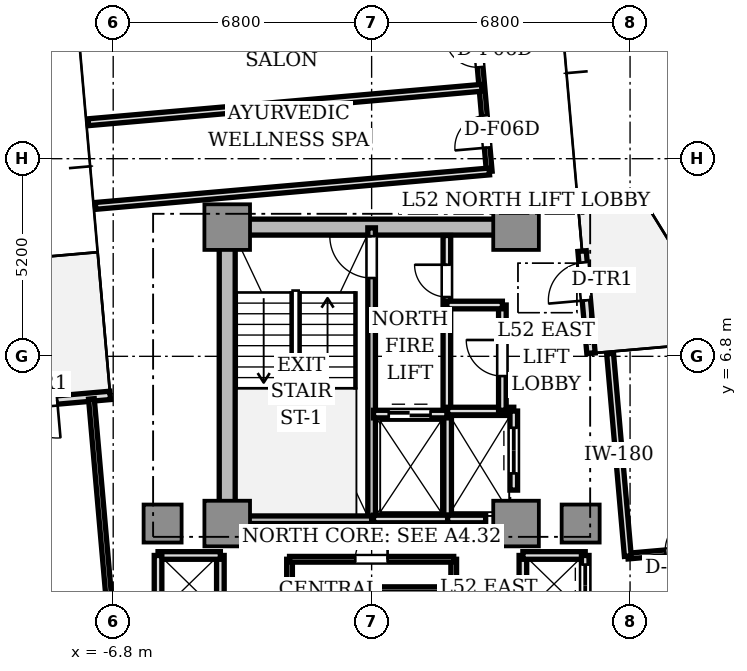
"""IFC4 building model, lengths in metres.
Left out: names, types, materials, properties, quantities, classifications, styles, units other than length and angle.
Written with IfcOpenShell. Run it as: python <this file> out.ifc"""

import sys

from ifc_helpers import new_model, si_unit, direction, frame, frame_2d, origin, origin_2d, place, context, subcontext, project, spatial, rectangle, extrude, source, transform, mapped, element, fill, save


model = new_model("IFC4")
c1 = context("Model", 3, precision=1e-05, world=origin(), true_north=direction((0.0, 1.0)))
c2 = subcontext(c1, "Body", "Model", "MODEL_VIEW")
j1 = project(units=[si_unit("LENGTHUNIT", "METRE"), si_unit("PLANEANGLEUNIT", "RADIAN")], contexts=[c1])
p1 = place(None, origin())
s1 = spatial("IfcSite", under=j1, at=p1, CompositionType="ELEMENT")
p2 = place(p1, origin())
s2 = spatial("IfcBuilding", under=s1, at=p2, CompositionType="ELEMENT")
p3 = place(p2, frame((0.0, 0.0, 188.6)))
s3 = spatial("IfcBuildingStorey", under=s2, at=p3, CompositionType="ELEMENT", Elevation=188.6)
p4 = place(p3, frame((-3.55, 10.2, 0.0), z_axis=(0.0, 0.0, 1.0), x_axis=(1.0, 0.0, 0.0)))
e1 = element("IfcWall", 1, at=p4, inside=s3, PredefinedType="SHEAR", context=c2, shape_type="SweptSolid", body=[
    extrude(rectangle(XDim=7.1, YDim=0.42, at=frame_2d((3.55, 0.0))), origin(), (0.0, 0.0, 1.0), 3.11),
])
p5 = place(p3, frame((-3.8, 2.85, 0.0), z_axis=(0.0, 0.0, 1.0), x_axis=(0.0, 1.0, 0.0)))
e2 = element("IfcWall", 2, at=p5, inside=s3, PredefinedType="SHEAR", context=c2, shape_type="SweptSolid", body=[
    extrude(rectangle(XDim=6.9, YDim=0.42, at=frame_2d((3.45, 0.0))), origin(), (0.0, 0.0, 1.0), 3.11),
])
m1 = source(origin(), c2, "Body", "SweptSolid", [
    extrude(rectangle(XDim=1.2, YDim=1.2, at=origin_2d()), origin(), (0.0, 0.0, 1.0), 3.11),
])
for number, where, z_axis, x_axis in (
    (3, (-3.8, 2.4, 0.0), (0.0, 0.0, 1.0), (1.0, 0.0, 0.0)),
    (4, (3.8, 2.4, 0.0), (0.0, 0.0, 1.0), (1.0, 0.0, 0.0)),
    (5, (-3.8, 10.2, 0.0), (0.0, 0.0, 1.0), (1.0, 0.0, 0.0)),
    (6, (3.8, 10.2, 0.0), (0.0, 0.0, 1.0), (1.0, 0.0, 0.0)),
):
    element("IfcColumn", number, at=place(p3, frame(where, z_axis=z_axis, x_axis=x_axis)), inside=s3, PredefinedType="COLUMN", context=c2, shape_type="MappedRepresentation", body=[
        mapped(m1, transform((0.0, 0.0, 0.0), scale=1.0)),
    ])
m2 = source(origin(), c2, "Body", "SweptSolid", [
    extrude(rectangle(XDim=1.0, YDim=1.0, at=origin_2d()), origin(), (0.0, 0.0, 1.0), 3.11),
])
for number, where, z_axis, x_axis in (
    (7, (5.5, 2.4, 0.0), (0.0, 0.0, 1.0), (1.0, 0.0, 0.0)),
    (8, (-5.5, 2.4, 0.0), (0.0, 0.0, 1.0), (1.0, 0.0, 0.0)),
):
    element("IfcColumn", number, at=place(p3, frame(where, z_axis=z_axis, x_axis=x_axis)), inside=s3, PredefinedType="COLUMN", context=c2, shape_type="MappedRepresentation", body=[
        mapped(m2, transform((0.0, 0.0, 0.0), scale=1.0)),
    ])
p6 = place(p3, frame((5.772, 6.879, 0.0), z_axis=(0.0, 0.0, 1.0), x_axis=(-0.087168071984, 0.996193619346, 0.0)))
e9 = element("IfcWall", 9, at=p6, inside=s3, PredefinedType="STANDARD", context=c2, shape_type="SweptSolid", body=[
    extrude(rectangle(XDim=2.7, YDim=0.22, at=frame_2d((1.35, 0.0))), origin(), (0.0, 0.0, 1.0), 3.11),
])
p7 = place(p6, frame((1.4, 0.0, 0.0)))
e10 = element("IfcOpeningElement", 10, at=p7, cuts=e9, PredefinedType="OPENING", context=c2, shape_type="SweptSolid", body=[
    extrude(rectangle(XDim=1.0, YDim=2.2, at=frame_2d((0.5, 1.1))), frame((0.0, 0.12, 0.0), z_axis=(0.0, -1.0, 0.0), x_axis=(1.0, 0.0, 0.0)), (0.0, 0.0, 1.0), 0.24),
])
p8 = place(p3, frame((-6.879, 5.772, 0.0), z_axis=(0.0, 0.0, 1.0), x_axis=(-0.996193619346, -0.087168071984, 0.0)))
e11 = element("IfcWall", 11, at=p8, inside=s3, PredefinedType="STANDARD", context=c2, shape_type="SweptSolid", body=[
    extrude(rectangle(XDim=2.7, YDim=0.22, at=frame_2d((1.35, 0.0))), origin(), (0.0, 0.0, 1.0), 3.11),
])
p9 = place(p8, frame((1.4, 0.0, 0.0)))
e12 = element("IfcOpeningElement", 12, at=p9, cuts=e11, PredefinedType="OPENING", context=c2, shape_type="SweptSolid", body=[
    extrude(rectangle(XDim=1.0, YDim=2.2, at=frame_2d((0.5, 1.1))), frame((0.0, 0.12, 0.0), z_axis=(0.0, -1.0, 0.0), x_axis=(1.0, 0.0, 0.0)), (0.0, 0.0, 1.0), 0.24),
])
p10 = place(p3, frame((0.0, 2.5, 0.0), z_axis=(0.0, 0.0, 1.0), x_axis=(0.0, 1.0, 0.0)))
e13 = element("IfcWall", 13, at=p10, inside=s3, PredefinedType="SOLIDWALL", context=c2, shape_type="SweptSolid", body=[
    extrude(rectangle(XDim=7.68, YDim=0.2, at=frame_2d((3.84, 0.0))), origin(), (0.0, 0.0, 1.0), 3.11),
])
p11 = place(p10, frame((6.36, 0.0, 0.0)))
e14 = element("IfcOpeningElement", 14, at=p11, cuts=e13, PredefinedType="OPENING", context=c2, shape_type="SweptSolid", body=[
    extrude(rectangle(XDim=1.1, YDim=2.15, at=frame_2d((0.55, 1.075))), frame((0.0, 0.11, 0.0), z_axis=(0.0, -1.0, 0.0), x_axis=(1.0, 0.0, 0.0)), (0.0, 0.0, 1.0), 0.22),
])
p12 = place(p3, frame((-3.72, 2.5, 0.0), z_axis=(0.0, 0.0, 1.0), x_axis=(1.0, 0.0, 0.0)))
e15 = element("IfcWall", 15, at=p12, inside=s3, PredefinedType="SOLIDWALL", context=c2, shape_type="SweptSolid", body=[
    extrude(rectangle(XDim=3.72, YDim=0.2, at=frame_2d((1.86, 0.0))), origin(), (0.0, 0.0, 1.0), 3.11),
])
p13 = place(p3, frame((1.98, 5.32, 0.0), z_axis=(0.0, 0.0, 1.0), x_axis=(0.0, 1.0, 0.0)))
e16 = element("IfcWall", 16, at=p13, inside=s3, PredefinedType="SOLIDWALL", context=c2, shape_type="SweptSolid", body=[
    extrude(rectangle(XDim=4.66, YDim=0.2, at=frame_2d((2.33, 0.0))), origin(), (0.0, 0.0, 1.0), 2.66),
])
p14 = place(p13, frame((3.04, 0.0, 0.0)))
e17 = element("IfcOpeningElement", 17, at=p14, cuts=e16, PredefinedType="OPENING", context=c2, shape_type="SweptSolid", body=[
    extrude(rectangle(XDim=0.85, YDim=2.1, at=frame_2d((0.425, 1.05))), frame((0.0, 0.11, 0.0), z_axis=(0.0, -1.0, 0.0), x_axis=(1.0, 0.0, 0.0)), (0.0, 0.0, 1.0), 0.22),
])
p15 = place(p3, frame((2.0, 2.5, 0.0), z_axis=(0.0, 0.0, 1.0), x_axis=(0.0, 1.0, 0.0)))
e18 = element("IfcWall", 18, at=p15, inside=s3, PredefinedType="SOLIDWALL", context=c2, shape_type="SweptSolid", body=[
    extrude(rectangle(XDim=2.78, YDim=0.2, at=frame_2d((1.39, 0.0))), origin(), (0.0, 0.0, 1.0), 2.66),
])
p16 = place(p3, frame((0.05, 2.52, 0.0), z_axis=(0.0, 0.0, 1.0), x_axis=(1.0, 0.0, 0.0)))
e19 = element("IfcWall", 19, at=p16, inside=s3, PredefinedType="SOLIDWALL", context=c2, shape_type="SweptSolid", body=[
    extrude(rectangle(XDim=1.95, YDim=0.2, at=frame_2d((0.975, 0.0))), origin(), (0.0, 0.0, 1.0), 2.66),
])
p17 = place(p3, frame((0.05, 5.28, 0.0), z_axis=(0.0, 0.0, 1.0), x_axis=(1.0, 0.0, 0.0)))
e20 = element("IfcWall", 20, at=p17, inside=s3, PredefinedType="SOLIDWALL", context=c2, shape_type="SweptSolid", body=[
    extrude(rectangle(XDim=1.93, YDim=0.2, at=frame_2d((0.965, 0.0))), origin(), (0.0, 0.0, 1.0), 2.66),
])
p18 = place(p17, frame((0.4, 0.0, 0.0)))
e21 = element("IfcOpeningElement", 21, at=p18, cuts=e20, PredefinedType="OPENING", context=c2, shape_type="SweptSolid", body=[
    extrude(rectangle(XDim=1.1, YDim=2.2, at=frame_2d((0.55, 1.1))), frame((0.0, 0.11, 0.0), z_axis=(0.0, -1.0, 0.0), x_axis=(1.0, 0.0, 0.0)), (0.0, 0.0, 1.0), 0.22),
])
p19 = place(p3, frame((2.0, 2.52, 0.0), z_axis=(0.0, 0.0, 1.0), x_axis=(1.0, 0.0, 0.0)))
e22 = element("IfcWall", 22, at=p19, inside=s3, PredefinedType="SOLIDWALL", context=c2, shape_type="SweptSolid", body=[
    extrude(rectangle(XDim=1.0, YDim=0.2, at=frame_2d((0.5, 0.0))), origin(), (0.0, 0.0, 1.0), 2.66),
])
p20 = place(p3, frame((2.0, 5.36, 0.0), z_axis=(0.0, 0.0, 1.0), x_axis=(1.0, 0.0, 0.0)))
e23 = element("IfcWall", 23, at=p20, inside=s3, PredefinedType="SOLIDWALL", context=c2, shape_type="SweptSolid", body=[
    extrude(rectangle(XDim=1.74, YDim=0.2, at=frame_2d((0.87, 0.0))), origin(), (0.0, 0.0, 1.0), 2.66),
])
p21 = place(p3, frame((3.74, 3.28, 0.0), z_axis=(0.0, 0.0, 1.0), x_axis=(0.0, 1.0, 0.0)))
e24 = element("IfcWall", 24, at=p21, inside=s3, PredefinedType="SOLIDWALL", context=c2, shape_type="SweptSolid", body=[
    extrude(rectangle(XDim=2.08, YDim=0.2, at=frame_2d((1.04, 0.0))), origin(), (0.0, 0.0, 1.0), 2.66),
])
p22 = place(p21, frame((0.44, 0.0, 0.0)))
e25 = element("IfcOpeningElement", 25, at=p22, cuts=e24, PredefinedType="OPENING", context=c2, shape_type="SweptSolid", body=[
    extrude(rectangle(XDim=1.2, YDim=2.2, at=frame_2d((0.6, 1.1))), frame((0.0, 0.11, 0.0), z_axis=(0.0, -1.0, 0.0), x_axis=(1.0, 0.0, 0.0)), (0.0, 0.0, 1.0), 0.22),
])
p23 = place(p3, frame((3.98, -1.56, 0.0), z_axis=(0.0, 0.0, 1.0), x_axis=(0.0, 1.0, 0.0)))
e26 = element("IfcWall", 26, at=p23, inside=s3, PredefinedType="SOLIDWALL", context=c2, shape_type="SweptSolid", body=[
    extrude(rectangle(XDim=3.12, YDim=0.2, at=frame_2d((1.56, 0.0))), origin(), (0.0, 0.0, 1.0), 2.28),
])
p24 = place(p3, frame((3.98, 1.56, 0.0), z_axis=(0.0, 0.0, 1.0), x_axis=(1.0, 0.0, 0.0)))
e27 = element("IfcWall", 27, at=p24, inside=s3, PredefinedType="SOLIDWALL", context=c2, shape_type="SweptSolid", body=[
    extrude(rectangle(XDim=1.64, YDim=0.2, at=frame_2d((0.82, 0.0))), origin(), (0.0, 0.0, 1.0), 2.66),
])
p25 = place(p3, frame((5.62, 0.0, 0.0), z_axis=(0.0, 0.0, 1.0), x_axis=(0.0, 1.0, 0.0)))
e28 = element("IfcWall", 28, at=p25, inside=s3, PredefinedType="SOLIDWALL", context=c2, shape_type="SweptSolid", body=[
    extrude(rectangle(XDim=1.56, YDim=0.2, at=frame_2d((0.78, 0.0))), origin(), (0.0, 0.0, 1.0), 2.66),
])
p26 = place(p25, frame((0.22, 0.0, 0.0)))
e29 = element("IfcOpeningElement", 29, at=p26, cuts=e28, PredefinedType="OPENING", context=c2, shape_type="SweptSolid", body=[
    extrude(rectangle(XDim=1.1, YDim=2.2, at=frame_2d((0.55, 1.1))), frame((0.0, 0.11, 0.0), z_axis=(0.0, -1.0, 0.0), x_axis=(1.0, 0.0, 0.0)), (0.0, 0.0, 1.0), 0.22),
])
p27 = place(p3, frame((-3.98, -1.56, 0.0), z_axis=(0.0, 0.0, 1.0), x_axis=(0.0, 1.0, 0.0)))
e30 = element("IfcWall", 30, at=p27, inside=s3, PredefinedType="SOLIDWALL", context=c2, shape_type="SweptSolid", body=[
    extrude(rectangle(XDim=3.12, YDim=0.2, at=frame_2d((1.56, 0.0))), origin(), (0.0, 0.0, 1.0), 2.28),
])
p28 = place(p3, frame((-5.62, 1.56, 0.0), z_axis=(0.0, 0.0, 1.0), x_axis=(1.0, 0.0, 0.0)))
e31 = element("IfcWall", 31, at=p28, inside=s3, PredefinedType="SOLIDWALL", context=c2, shape_type="SweptSolid", body=[
    extrude(rectangle(XDim=1.64, YDim=0.2, at=frame_2d((0.82, 0.0))), origin(), (0.0, 0.0, 1.0), 2.66),
])
p29 = place(p3, frame((-5.62, 0.0, 0.0), z_axis=(0.0, 0.0, 1.0), x_axis=(0.0, 1.0, 0.0)))
e32 = element("IfcWall", 32, at=p29, inside=s3, PredefinedType="SOLIDWALL", context=c2, shape_type="SweptSolid", body=[
    extrude(rectangle(XDim=1.56, YDim=0.2, at=frame_2d((0.78, 0.0))), origin(), (0.0, 0.0, 1.0), 2.66),
])
p30 = place(p3, frame((3.44, 5.38, 0.0), z_axis=(0.0, 0.0, 1.0), x_axis=(0.0, 1.0, 0.0)))
e33 = element("IfcWall", 33, at=p30, inside=s3, PredefinedType="SOLIDWALL", context=c2, shape_type="SweptSolid", body=[
    extrude(rectangle(XDim=2.77, YDim=0.2, at=frame_2d((1.385, 0.0))), origin(), (0.0, 0.0, 1.0), 2.66),
])
p31 = place(p30, frame((0.9, 0.0, 0.0)))
e34 = element("IfcOpeningElement", 34, at=p31, cuts=e33, PredefinedType="OPENING", context=c2, shape_type="SweptSolid", body=[
    extrude(rectangle(XDim=0.95, YDim=2.15, at=frame_2d((0.475, 1.075))), frame((0.0, 0.11, 0.0), z_axis=(0.0, -1.0, 0.0), x_axis=(1.0, 0.0, 0.0)), (0.0, 0.0, 1.0), 0.22),
])
p32 = place(p3, frame((1.98, 8.15, 0.0), z_axis=(0.0, 0.0, 1.0), x_axis=(1.0, 0.0, 0.0)))
e35 = element("IfcWall", 35, at=p32, inside=s3, PredefinedType="SOLIDWALL", context=c2, shape_type="SweptSolid", body=[
    extrude(rectangle(XDim=1.46, YDim=0.2, at=frame_2d((0.73, 0.0))), origin(), (0.0, 0.0, 1.0), 2.66),
])
p33 = place(p3, frame((2.16, -1.46, 0.0), z_axis=(0.0, 0.0, 1.0), x_axis=(0.0, 1.0, 0.0)))
e36 = element("IfcWall", 36, at=p33, inside=s3, PredefinedType="PARTITIONING", context=c2, shape_type="SweptSolid", body=[
    extrude(rectangle(XDim=2.92, YDim=0.15, at=frame_2d((1.46, 0.0))), origin(), (0.0, 0.0, 1.0), 2.66),
])
p34 = place(p33, frame((1.035, 0.0, 0.0)))
e37 = element("IfcOpeningElement", 37, at=p34, cuts=e36, PredefinedType="OPENING", context=c2, shape_type="SweptSolid", body=[
    extrude(rectangle(XDim=0.85, YDim=2.1, at=frame_2d((0.425, 1.05))), frame((0.0, 0.085, 0.0), z_axis=(0.0, -1.0, 0.0), x_axis=(1.0, 0.0, 0.0)), (0.0, 0.0, 1.0), 0.17),
])
p35 = place(p3, frame((-2.16, -1.46, 0.0), z_axis=(0.0, 0.0, 1.0), x_axis=(0.0, 1.0, 0.0)))
e38 = element("IfcWall", 38, at=p35, inside=s3, PredefinedType="PARTITIONING", context=c2, shape_type="SweptSolid", body=[
    extrude(rectangle(XDim=2.92, YDim=0.15, at=frame_2d((1.46, 0.0))), origin(), (0.0, 0.0, 1.0), 2.66),
])
p36 = place(p3, frame((-2.16, 1.46, 0.0), z_axis=(0.0, 0.0, 1.0), x_axis=(1.0, 0.0, 0.0)))
e39 = element("IfcWall", 39, at=p36, inside=s3, PredefinedType="PARTITIONING", context=c2, shape_type="SweptSolid", body=[
    extrude(rectangle(XDim=4.32, YDim=0.15, at=frame_2d((2.16, 0.0))), origin(), (0.0, 0.0, 1.0), 2.66),
])
p37 = place(p36, frame((1.73, 0.0, 0.0)))
e40 = element("IfcOpeningElement", 40, at=p37, cuts=e39, PredefinedType="OPENING", context=c2, shape_type="SweptSolid", body=[
    extrude(rectangle(XDim=0.85, YDim=2.1, at=frame_2d((0.425, 1.05))), frame((0.0, 0.085, 0.0), z_axis=(0.0, -1.0, 0.0), x_axis=(1.0, 0.0, 0.0)), (0.0, 0.0, 1.0), 0.17),
])
p38 = place(p3, frame((-2.16, 0.66, 0.0), z_axis=(0.0, 0.0, 1.0), x_axis=(1.0, 0.0, 0.0)))
e41 = element("IfcWall", 41, at=p38, inside=s3, PredefinedType="PARTITIONING", context=c2, shape_type="SweptSolid", body=[
    extrude(rectangle(XDim=4.32, YDim=0.15, at=frame_2d((2.16, 0.0))), origin(), (0.0, 0.0, 1.0), 2.66),
])
p39 = place(p3, frame((6.741, 1.543, 0.0), z_axis=(0.0, 0.0, 1.0), x_axis=(0.996195062465, 0.087151577845, 0.0)))
e42 = element("IfcWall", 42, at=p39, inside=s3, PredefinedType="PARTITIONING", context=c2, shape_type="SweptSolid", body=[
    extrude(rectangle(XDim=13.2, YDim=0.15, at=frame_2d((6.6, 0.0))), origin(), (0.0, 0.0, 1.0), 2.66),
])
p40 = place(p39, frame((0.992, 0.0, 0.0)))
e43 = element("IfcOpeningElement", 43, at=p40, cuts=e42, PredefinedType="OPENING", context=c2, shape_type="SweptSolid", body=[
    extrude(rectangle(XDim=0.85, YDim=2.1, at=frame_2d((0.425, 1.05))), frame((0.0, 0.085, 0.0), z_axis=(0.0, -1.0, 0.0), x_axis=(1.0, 0.0, 0.0)), (0.0, 0.0, 1.0), 0.17),
])
p41 = place(p39, frame((7.342, 0.0, 0.0)))
e44 = element("IfcOpeningElement", 44, at=p41, cuts=e42, PredefinedType="OPENING", context=c2, shape_type="SweptSolid", body=[
    extrude(rectangle(XDim=0.85, YDim=2.1, at=frame_2d((0.425, 1.05))), frame((0.0, 0.085, 0.0), z_axis=(0.0, -1.0, 0.0), x_axis=(1.0, 0.0, 0.0)), (0.0, 0.0, 1.0), 0.17),
])
p42 = place(p3, frame((6.907, -0.349, 0.0), z_axis=(0.0, 0.0, 1.0), x_axis=(0.996195062465, 0.087151577845, 0.0)))
e45 = element("IfcWall", 45, at=p42, inside=s3, PredefinedType="PARTITIONING", context=c2, shape_type="SweptSolid", body=[
    extrude(rectangle(XDim=13.2, YDim=0.15, at=frame_2d((6.6, 0.0))), origin(), (0.0, 0.0, 1.0), 2.66),
])
p43 = place(p42, frame((2.458, 0.0, 0.0)))
e46 = element("IfcOpeningElement", 46, at=p43, cuts=e45, PredefinedType="OPENING", context=c2, shape_type="SweptSolid", body=[
    extrude(rectangle(XDim=0.85, YDim=2.1, at=frame_2d((0.425, 1.05))), frame((0.0, 0.085, 0.0), z_axis=(0.0, -1.0, 0.0), x_axis=(1.0, 0.0, 0.0)), (0.0, 0.0, 1.0), 0.17),
])
p44 = place(p42, frame((9.308, 0.0, 0.0)))
e47 = element("IfcOpeningElement", 47, at=p44, cuts=e45, PredefinedType="OPENING", context=c2, shape_type="SweptSolid", body=[
    extrude(rectangle(XDim=0.85, YDim=2.1, at=frame_2d((0.425, 1.05))), frame((0.0, 0.085, 0.0), z_axis=(0.0, -1.0, 0.0), x_axis=(1.0, 0.0, 0.0)), (0.0, 0.0, 1.0), 0.17),
])
p45 = place(p3, frame((6.741, 1.543, 0.0), z_axis=(0.0, 0.0, 1.0), x_axis=(-0.087161289348, 0.996194212812, 0.0)))
e48 = element("IfcWall", 48, at=p45, inside=s3, PredefinedType="PARTITIONING", context=c2, shape_type="SweptSolid", body=[
    extrude(rectangle(XDim=5.35, YDim=0.18, at=frame_2d((2.675, 0.0))), origin(), (0.0, 0.0, 1.0), 2.66),
])
p46 = place(p3, frame((3.095, 11.664, 0.0), z_axis=(0.0, 0.0, 1.0), x_axis=(-0.087142722004, 0.996195837173, 0.0)))
e49 = element("IfcWall", 49, at=p46, inside=s3, PredefinedType="PARTITIONING", context=c2, shape_type="SweptSolid", body=[
    extrude(rectangle(XDim=4.25, YDim=0.15, at=frame_2d((2.125, 0.0))), origin(), (0.0, 0.0, 1.0), 2.66),
])
p47 = place(p46, frame((0.63, 0.0, 0.0)))
e50 = element("IfcOpeningElement", 50, at=p47, cuts=e49, PredefinedType="OPENING", context=c2, shape_type="SweptSolid", body=[
    extrude(rectangle(XDim=0.85, YDim=2.1, at=frame_2d((0.425, 1.05))), frame((0.0, 0.085, 0.0), z_axis=(0.0, -1.0, 0.0), x_axis=(1.0, 0.0, 0.0)), (0.0, 0.0, 1.0), 0.17),
])
p48 = place(p46, frame((2.755, 0.0, 0.0)))
e51 = element("IfcOpeningElement", 51, at=p48, cuts=e49, PredefinedType="OPENING", context=c2, shape_type="SweptSolid", body=[
    extrude(rectangle(XDim=0.85, YDim=2.1, at=frame_2d((0.425, 1.05))), frame((0.0, 0.085, 0.0), z_axis=(0.0, -1.0, 0.0), x_axis=(1.0, 0.0, 0.0)), (0.0, 0.0, 1.0), 0.17),
])
p49 = place(p3, frame((3.095, 11.664, 0.0), z_axis=(0.0, 0.0, 1.0), x_axis=(-0.996196061386, -0.087140158824, 0.0)))
e52 = element("IfcWall", 52, at=p49, inside=s3, PredefinedType="PARTITIONING", context=c2, shape_type="SweptSolid", body=[
    extrude(rectangle(XDim=10.4, YDim=0.18, at=frame_2d((5.2, 0.0))), origin(), (0.0, 0.0, 1.0), 2.66),
])
p50 = place(p3, frame((2.903, 13.866, 0.0), z_axis=(0.0, 0.0, 1.0), x_axis=(-0.996194201607, -0.087161417409, 0.0)))
e53 = element("IfcWall", 53, at=p50, inside=s3, PredefinedType="PARTITIONING", context=c2, shape_type="SweptSolid", body=[
    extrude(rectangle(XDim=10.4, YDim=0.18, at=frame_2d((5.2, 0.0))), origin(), (0.0, 0.0, 1.0), 2.66),
])
p51 = place(p3, frame((-7.373, 5.679, 0.0), z_axis=(0.0, 0.0, 1.0), x_axis=(0.087154691724, -0.996194790044, 0.0)))
e54 = element("IfcWall", 54, at=p51, inside=s3, PredefinedType="PARTITIONING", context=c2, shape_type="SweptSolid", body=[
    extrude(rectangle(XDim=12.6, YDim=0.15, at=frame_2d((6.3, 0.0))), origin(), (0.0, 0.0, 1.0), 2.66),
])
p52 = place(p51, frame((5.5, 0.0, 0.0)))
e55 = element("IfcOpeningElement", 55, at=p52, cuts=e54, PredefinedType="OPENING", context=c2, shape_type="SweptSolid", body=[
    extrude(rectangle(XDim=1.6, YDim=2.25, at=frame_2d((0.8, 1.125))), frame((0.0, 0.085, 0.0), z_axis=(0.0, -1.0, 0.0), x_axis=(1.0, 0.0, 0.0)), (0.0, 0.0, 1.0), 0.17),
])
m3 = source(origin(), c2, "Body", "SweptSolid", [
    extrude(rectangle(XDim=1.0, YDim=0.05, at=origin_2d()), origin(), (0.0, 0.0, 1.0), 2.2),
])
p53 = place(p7, frame((0.5, 0.0, 0.0)))
e56 = element("IfcDoor", 56, at=p53, inside=s3, OperationType="SINGLE_SWING_LEFT", PredefinedType="DOOR", context=c2, shape_type="MappedRepresentation", body=[
    mapped(m3, transform((0.0, 0.0, 0.0), scale=1.0)),
])
fill(e10, e56)
p54 = place(p9, frame((0.5, 0.0, 0.0)))
e57 = element("IfcDoor", 57, at=p54, inside=s3, OperationType="SINGLE_SWING_LEFT", PredefinedType="DOOR", context=c2, shape_type="MappedRepresentation", body=[
    mapped(m3, transform((0.0, 0.0, 0.0), scale=1.0)),
])
fill(e12, e57)
m4 = source(origin(), c2, "Body", "SweptSolid", [
    extrude(rectangle(XDim=1.1, YDim=0.05, at=origin_2d()), origin(), (0.0, 0.0, 1.0), 2.15),
])
p55 = place(p11, frame((0.55, 0.0, 0.0)))
e58 = element("IfcDoor", 58, at=p55, inside=s3, OperationType="SINGLE_SWING_RIGHT", PredefinedType="DOOR", context=c2, shape_type="MappedRepresentation", body=[
    mapped(m4, transform((0.0, 0.0, 0.0), scale=1.0)),
])
fill(e14, e58)
m5 = source(origin(), c2, "Body", "SweptSolid", [
    extrude(rectangle(XDim=0.85, YDim=0.05, at=origin_2d()), origin(), (0.0, 0.0, 1.0), 2.1),
])
p56 = place(p14, frame((0.425, 0.0, 0.0)))
e59 = element("IfcDoor", 59, at=p56, inside=s3, OperationType="SINGLE_SWING_RIGHT", PredefinedType="DOOR", context=c2, shape_type="MappedRepresentation", body=[
    mapped(m5, transform((0.0, 0.0, 0.0), scale=1.0)),
])
fill(e17, e59)
m6 = source(origin(), c2, "Body", "SweptSolid", [
    extrude(rectangle(XDim=1.1, YDim=0.05, at=origin_2d()), origin(), (0.0, 0.0, 1.0), 2.2),
])
p57 = place(p18, frame((0.55, 0.0, 0.0)))
e60 = element("IfcDoor", 60, at=p57, inside=s3, OperationType="DOUBLE_DOOR_SLIDING", PredefinedType="DOOR", context=c2, shape_type="MappedRepresentation", body=[
    mapped(m6, transform((0.0, 0.0, 0.0), scale=1.0)),
])
fill(e21, e60)
m7 = source(origin(), c2, "Body", "SweptSolid", [
    extrude(rectangle(XDim=1.2, YDim=0.05, at=origin_2d()), origin(), (0.0, 0.0, 1.0), 2.2),
])
p58 = place(p22, frame((0.6, 0.0, 0.0)))
e61 = element("IfcDoor", 61, at=p58, inside=s3, OperationType="DOUBLE_DOOR_SLIDING", PredefinedType="DOOR", context=c2, shape_type="MappedRepresentation", body=[
    mapped(m7, transform((0.0, 0.0, 0.0), scale=1.0)),
])
fill(e25, e61)
p59 = place(p26, frame((0.55, 0.0, 0.0)))
e62 = element("IfcDoor", 62, at=p59, inside=s3, OperationType="DOUBLE_DOOR_SLIDING", PredefinedType="DOOR", context=c2, shape_type="MappedRepresentation", body=[
    mapped(m6, transform((0.0, 0.0, 0.0), scale=1.0)),
])
fill(e29, e62)
m8 = source(origin(), c2, "Body", "SweptSolid", [
    extrude(rectangle(XDim=0.95, YDim=0.05, at=origin_2d()), origin(), (0.0, 0.0, 1.0), 2.15),
])
p60 = place(p31, frame((0.475, 0.0, 0.0)))
e63 = element("IfcDoor", 63, at=p60, inside=s3, OperationType="SINGLE_SWING_RIGHT", PredefinedType="DOOR", context=c2, shape_type="MappedRepresentation", body=[
    mapped(m8, transform((0.0, 0.0, 0.0), scale=1.0)),
])
fill(e34, e63)
p61 = place(p37, frame((0.425, 0.0, 0.0)))
e64 = element("IfcDoor", 64, at=p61, inside=s3, OperationType="SINGLE_SWING_RIGHT", PredefinedType="DOOR", context=c2, shape_type="MappedRepresentation", body=[
    mapped(m5, transform((0.0, 0.0, 0.0), scale=1.0)),
])
fill(e40, e64)
p62 = place(p40, frame((0.425, 0.0, 0.0)))
e65 = element("IfcDoor", 65, at=p62, inside=s3, OperationType="SINGLE_SWING_RIGHT", PredefinedType="DOOR", context=c2, shape_type="MappedRepresentation", body=[
    mapped(m5, transform((0.0, 0.0, 0.0), scale=1.0)),
])
fill(e43, e65)
p63 = place(p47, frame((0.425, 0.0, 0.0)))
e66 = element("IfcDoor", 66, at=p63, inside=s3, OperationType="SINGLE_SWING_LEFT", PredefinedType="DOOR", context=c2, shape_type="MappedRepresentation", body=[
    mapped(m5, transform((0.0, 0.0, 0.0), scale=1.0)),
])
fill(e50, e66)
p64 = place(p48, frame((0.425, 0.0, 0.0)))
e67 = element("IfcDoor", 67, at=p64, inside=s3, OperationType="SINGLE_SWING_RIGHT", PredefinedType="DOOR", context=c2, shape_type="MappedRepresentation", body=[
    mapped(m5, transform((0.0, 0.0, 0.0), scale=1.0)),
])
fill(e51, e67)
save(model, sys.argv[1])
